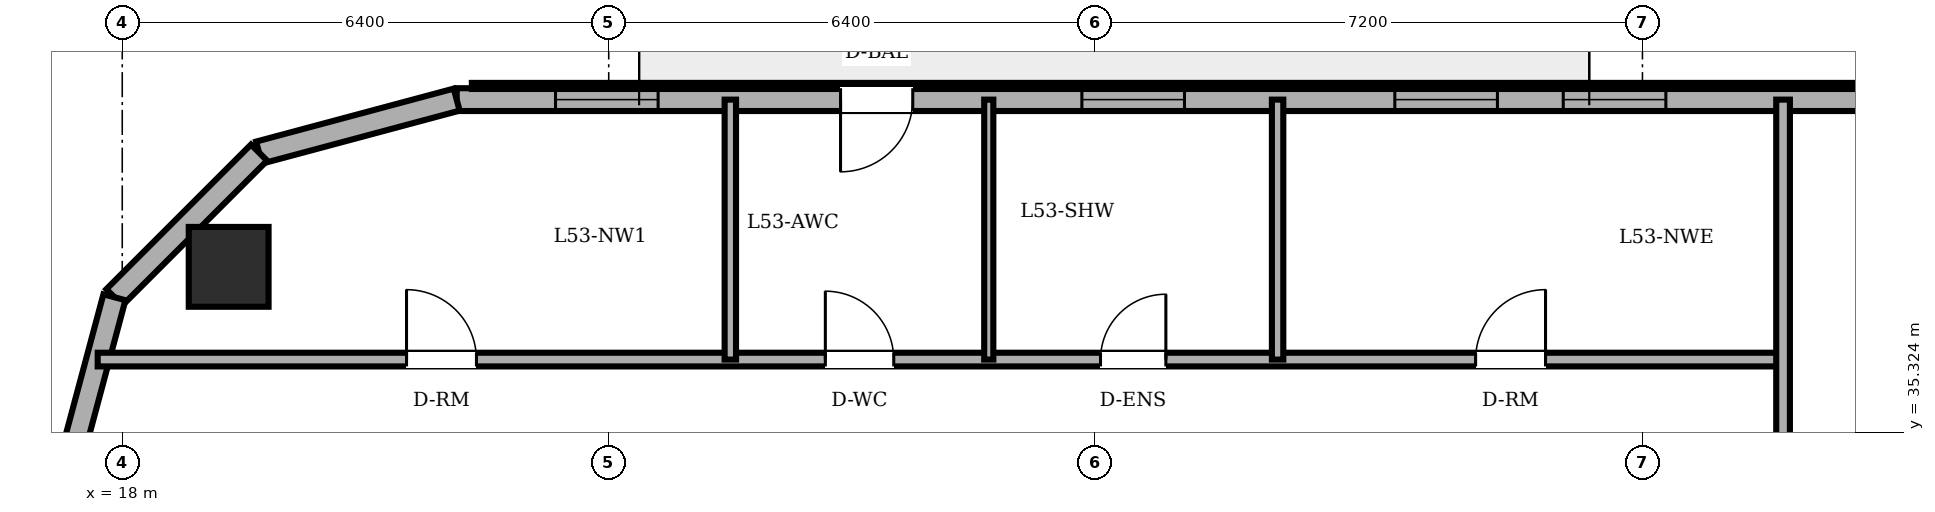
"""IFC4 building model, lengths in metres.
Left out: names, types, materials, properties, quantities, classifications, styles, units other than length and angle.
Written with IfcOpenShell. Run it as: python <this file> out.ifc"""

import sys

from ifc_helpers import new_model, si_unit, direction, frame, frame_2d, origin, origin_2d, place, context, subcontext, project, spatial, rectangle, circle, extrude, element, fill, save


model = new_model("IFC4")
c1 = context("Model", 3, precision=1e-05, world=origin(), true_north=direction((0.0, 1.0)))
c2 = subcontext(c1, "Body", "Model", "MODEL_VIEW")
j1 = project(units=[si_unit("LENGTHUNIT", "METRE"), si_unit("PLANEANGLEUNIT", "RADIAN")], contexts=[c1])
p1 = place(None, origin())
s1 = spatial("IfcSite", under=j1, at=p1, CompositionType="ELEMENT")
p2 = place(p1, origin())
s2 = spatial("IfcBuilding", under=s1, at=p2, CompositionType="ELEMENT")
p3 = place(p2, frame((0.0, 0.0, 204.9)))
s3 = spatial("IfcBuildingStorey", under=s2, at=p3, CompositionType="ELEMENT", Elevation=204.9)
p4 = place(p3, frame((19.4, 37.5, 0.0), z_axis=(0.0, 0.0, 1.0), x_axis=(1.0, 0.0, 0.0)))
e1 = element("IfcColumn", 1, at=p4, inside=s3, PredefinedType="COLUMN", context=c2, shape_type="SweptSolid", body=[
    extrude(circle(Radius=0.525, at=origin_2d()), origin(), (0.0, 0.0, 1.0), 3.6),
])
p5 = place(p3, frame((54.885, 39.7, 0.0), z_axis=(0.0, 0.0, 1.0), x_axis=(-1.0, 0.0, 0.0)))
e2 = element("IfcWall", 2, at=p5, inside=s3, PredefinedType="SOLIDWALL", context=c2, shape_type="SweptSolid", body=[
    extrude(rectangle(XDim=32.485, YDim=0.3, at=frame_2d((16.243, 0.0))), origin(), (0.0, 0.0, 1.0), 3.4),
])
p6 = place(p5, frame((26.485, 0.0, 0.0)))
e3 = element("IfcOpeningElement", 3, at=p6, cuts=e2, PredefinedType="OPENING", context=c2, shape_type="SweptSolid", body=[
    extrude(rectangle(XDim=0.95, YDim=2.2, at=frame_2d((0.475, 1.1))), frame((0.0, 0.16, 0.0), z_axis=(0.0, -1.0, 0.0), x_axis=(1.0, 0.0, 0.0)), (0.0, 0.0, 1.0), 0.32),
])
p7 = place(p5, frame((5.846, 0.0, 0.85)))
e4 = element("IfcOpeningElement", 4, at=p7, cuts=e2, PredefinedType="OPENING", context=c2, shape_type="SweptSolid", body=[
    extrude(rectangle(XDim=1.35, YDim=1.55, at=frame_2d((0.675, 0.775))), frame((0.0, 0.16, 0.0), z_axis=(0.0, -1.0, 0.0), x_axis=(1.0, 0.0, 0.0)), (0.0, 0.0, 1.0), 0.32),
])
p8 = place(p5, frame((10.103, 0.0, 0.85)))
e5 = element("IfcOpeningElement", 5, at=p8, cuts=e2, PredefinedType="OPENING", context=c2, shape_type="SweptSolid", body=[
    extrude(rectangle(XDim=1.35, YDim=1.55, at=frame_2d((0.675, 0.775))), frame((0.0, 0.16, 0.0), z_axis=(0.0, -1.0, 0.0), x_axis=(1.0, 0.0, 0.0)), (0.0, 0.0, 1.0), 0.32),
])
p9 = place(p5, frame((16.577, 0.0, 0.85)))
e6 = element("IfcOpeningElement", 6, at=p9, cuts=e2, PredefinedType="OPENING", context=c2, shape_type="SweptSolid", body=[
    extrude(rectangle(XDim=1.35, YDim=1.55, at=frame_2d((0.675, 0.775))), frame((0.0, 0.16, 0.0), z_axis=(0.0, -1.0, 0.0), x_axis=(1.0, 0.0, 0.0)), (0.0, 0.0, 1.0), 0.32),
])
p10 = place(p5, frame((18.793, 0.0, 0.85)))
e7 = element("IfcOpeningElement", 7, at=p10, cuts=e2, PredefinedType="OPENING", context=c2, shape_type="SweptSolid", body=[
    extrude(rectangle(XDim=1.35, YDim=1.55, at=frame_2d((0.675, 0.775))), frame((0.0, 0.16, 0.0), z_axis=(0.0, -1.0, 0.0), x_axis=(1.0, 0.0, 0.0)), (0.0, 0.0, 1.0), 0.32),
])
p11 = place(p5, frame((22.91, 0.0, 0.85)))
e8 = element("IfcOpeningElement", 8, at=p11, cuts=e2, PredefinedType="OPENING", context=c2, shape_type="SweptSolid", body=[
    extrude(rectangle(XDim=1.35, YDim=1.55, at=frame_2d((0.675, 0.775))), frame((0.0, 0.16, 0.0), z_axis=(0.0, -1.0, 0.0), x_axis=(1.0, 0.0, 0.0)), (0.0, 0.0, 1.0), 0.32),
])
p12 = place(p5, frame((29.835, 0.0, 0.85)))
e9 = element("IfcOpeningElement", 9, at=p12, cuts=e2, PredefinedType="OPENING", context=c2, shape_type="SweptSolid", body=[
    extrude(rectangle(XDim=1.35, YDim=1.55, at=frame_2d((0.675, 0.775))), frame((0.0, 0.16, 0.0), z_axis=(0.0, -1.0, 0.0), x_axis=(1.0, 0.0, 0.0)), (0.0, 0.0, 1.0), 0.32),
])
p13 = place(p3, frame((22.4, 39.7, 0.0), z_axis=(0.0, 0.0, 1.0), x_axis=(-0.965889330541, -0.258955210695, 0.0)))
e10 = element("IfcWall", 10, at=p13, inside=s3, PredefinedType="SOLIDWALL", context=c2, shape_type="SweptSolid", body=[
    extrude(rectangle(XDim=2.692, YDim=0.3, at=frame_2d((1.346, 0.0))), origin(), (0.0, 0.0, 1.0), 3.4),
])
p14 = place(p3, frame((19.8, 39.003, 0.0), z_axis=(0.0, 0.0, 1.0), x_axis=(-0.707152139074, -0.70706142039, 0.0)))
e11 = element("IfcWall", 11, at=p14, inside=s3, PredefinedType="SOLIDWALL", context=c2, shape_type="SweptSolid", body=[
    extrude(rectangle(XDim=2.691, YDim=0.3, at=frame_2d((1.346, 0.0))), origin(), (0.0, 0.0, 1.0), 3.4),
])
p15 = place(p3, frame((17.897, 37.1, 0.0), z_axis=(0.0, 0.0, 1.0), x_axis=(-0.258932525951, -0.965895412042, 0.0)))
e12 = element("IfcWall", 12, at=p15, inside=s3, PredefinedType="SOLIDWALL", context=c2, shape_type="SweptSolid", body=[
    extrude(rectangle(XDim=2.692, YDim=0.3, at=frame_2d((1.346, 0.0))), origin(), (0.0, 0.0, 1.0), 3.4),
])
p16 = place(p3, frame((17.677, 36.28, 0.0), z_axis=(0.0, 0.0, 1.0), x_axis=(1.0, 0.0, 0.0)))
e13 = element("IfcWall", 13, at=p16, inside=s3, PredefinedType="PARTITIONING", context=c2, shape_type="SweptSolid", body=[
    extrude(rectangle(XDim=22.173, YDim=0.18, at=frame_2d((11.086, 0.0))), origin(), (0.0, 0.0, 1.0), 3.4),
])
p17 = place(p16, frame((9.573, 0.0, 0.0)))
e14 = element("IfcOpeningElement", 14, at=p17, cuts=e13, PredefinedType="OPENING", context=c2, shape_type="SweptSolid", body=[
    extrude(rectangle(XDim=0.9, YDim=2.1, at=frame_2d((0.45, 1.05))), frame((0.0, 0.1, 0.0), z_axis=(0.0, -1.0, 0.0), x_axis=(1.0, 0.0, 0.0)), (0.0, 0.0, 1.0), 0.2),
])
p18 = place(p16, frame((13.193, 0.0, 0.0)))
e15 = element("IfcOpeningElement", 15, at=p18, cuts=e13, PredefinedType="OPENING", context=c2, shape_type="SweptSolid", body=[
    extrude(rectangle(XDim=0.86, YDim=2.1, at=frame_2d((0.43, 1.05))), frame((0.0, 0.1, 0.0), z_axis=(0.0, -1.0, 0.0), x_axis=(1.0, 0.0, 0.0)), (0.0, 0.0, 1.0), 0.2),
])
p19 = place(p16, frame((4.063, 0.0, 0.0)))
e16 = element("IfcOpeningElement", 16, at=p19, cuts=e13, PredefinedType="OPENING", context=c2, shape_type="SweptSolid", body=[
    extrude(rectangle(XDim=0.92, YDim=2.1, at=frame_2d((0.46, 1.05))), frame((0.0, 0.1, 0.0), z_axis=(0.0, -1.0, 0.0), x_axis=(1.0, 0.0, 0.0)), (0.0, 0.0, 1.0), 0.2),
])
p20 = place(p16, frame((18.128, 0.0, 0.0)))
e17 = element("IfcOpeningElement", 17, at=p20, cuts=e13, PredefinedType="OPENING", context=c2, shape_type="SweptSolid", body=[
    extrude(rectangle(XDim=0.92, YDim=2.1, at=frame_2d((0.46, 1.05))), frame((0.0, 0.1, 0.0), z_axis=(0.0, -1.0, 0.0), x_axis=(1.0, 0.0, 0.0)), (0.0, 0.0, 1.0), 0.2),
])
p21 = place(p3, frame((26.0, 36.28, 0.0), z_axis=(0.0, 0.0, 1.0), x_axis=(0.0, 1.0, 0.0)))
e18 = element("IfcWall", 18, at=p21, inside=s3, PredefinedType="PARTITIONING", context=c2, shape_type="SweptSolid", body=[
    extrude(rectangle(XDim=3.42, YDim=0.15, at=frame_2d((1.71, 0.0))), origin(), (0.0, 0.0, 1.0), 3.4),
])
p22 = place(p3, frame((29.4, 36.28, 0.0), z_axis=(0.0, 0.0, 1.0), x_axis=(0.0, 1.0, 0.0)))
e19 = element("IfcWall", 19, at=p22, inside=s3, PredefinedType="PARTITIONING", context=c2, shape_type="SweptSolid", body=[
    extrude(rectangle(XDim=3.42, YDim=0.12, at=frame_2d((1.71, 0.0))), origin(), (0.0, 0.0, 1.0), 3.4),
])
p23 = place(p3, frame((33.2, 36.28, 0.0), z_axis=(0.0, 0.0, 1.0), x_axis=(0.0, 1.0, 0.0)))
e20 = element("IfcWall", 20, at=p23, inside=s3, PredefinedType="PARTITIONING", context=c2, shape_type="SweptSolid", body=[
    extrude(rectangle(XDim=3.42, YDim=0.15, at=frame_2d((1.71, 0.0))), origin(), (0.0, 0.0, 1.0), 3.4),
])
p24 = place(p3, frame((39.85, 25.18, 0.0), z_axis=(0.0, 0.0, 1.0), x_axis=(0.0, 1.0, 0.0)))
e21 = element("IfcWall", 21, at=p24, inside=s3, PredefinedType="PARTITIONING", context=c2, shape_type="SweptSolid", body=[
    extrude(rectangle(XDim=14.52, YDim=0.18, at=frame_2d((7.26, 0.0))), origin(), (0.0, 0.0, 1.0), 3.4),
])
p25 = place(p6, origin())
e22 = element("IfcDoor", 22, at=p25, inside=s3, OperationType="SINGLE_SWING_RIGHT", PredefinedType="DOOR", context=c2, shape_type="SweptSolid", body=[
    extrude(rectangle(XDim=0.95, YDim=2.2, at=frame_2d((0.475, 1.1))), frame((0.0, 0.025, 0.0), z_axis=(0.0, -1.0, 0.0), x_axis=(1.0, 0.0, 0.0)), (0.0, 0.0, 1.0), 0.05),
])
fill(e3, e22)
p26 = place(p9, origin())
e23 = element("IfcWindow", 23, at=p26, inside=s3, PartitioningType="SINGLE_PANEL", PredefinedType="WINDOW", context=c2, shape_type="SweptSolid", body=[
    extrude(rectangle(XDim=1.35, YDim=1.55, at=frame_2d((0.675, 0.775))), frame((0.0, 0.03, 0.0), z_axis=(0.0, -1.0, 0.0), x_axis=(1.0, 0.0, 0.0)), (0.0, 0.0, 1.0), 0.06),
])
fill(e6, e23)
p27 = place(p10, origin())
e24 = element("IfcWindow", 24, at=p27, inside=s3, PartitioningType="SINGLE_PANEL", PredefinedType="WINDOW", context=c2, shape_type="SweptSolid", body=[
    extrude(rectangle(XDim=1.35, YDim=1.55, at=frame_2d((0.675, 0.775))), frame((0.0, 0.03, 0.0), z_axis=(0.0, -1.0, 0.0), x_axis=(1.0, 0.0, 0.0)), (0.0, 0.0, 1.0), 0.06),
])
fill(e7, e24)
p28 = place(p11, origin())
e25 = element("IfcWindow", 25, at=p28, inside=s3, PartitioningType="SINGLE_PANEL", PredefinedType="WINDOW", context=c2, shape_type="SweptSolid", body=[
    extrude(rectangle(XDim=1.35, YDim=1.55, at=frame_2d((0.675, 0.775))), frame((0.0, 0.03, 0.0), z_axis=(0.0, -1.0, 0.0), x_axis=(1.0, 0.0, 0.0)), (0.0, 0.0, 1.0), 0.06),
])
fill(e8, e25)
p29 = place(p12, origin())
e26 = element("IfcWindow", 26, at=p29, inside=s3, PartitioningType="SINGLE_PANEL", PredefinedType="WINDOW", context=c2, shape_type="SweptSolid", body=[
    extrude(rectangle(XDim=1.35, YDim=1.55, at=frame_2d((0.675, 0.775))), frame((0.0, 0.03, 0.0), z_axis=(0.0, -1.0, 0.0), x_axis=(1.0, 0.0, 0.0)), (0.0, 0.0, 1.0), 0.06),
])
fill(e9, e26)
p30 = place(p17, origin())
e27 = element("IfcDoor", 27, at=p30, inside=s3, OperationType="SINGLE_SWING_LEFT", PredefinedType="DOOR", context=c2, shape_type="SweptSolid", body=[
    extrude(rectangle(XDim=0.9, YDim=2.1, at=frame_2d((0.45, 1.05))), frame((0.0, 0.025, 0.0), z_axis=(0.0, -1.0, 0.0), x_axis=(1.0, 0.0, 0.0)), (0.0, 0.0, 1.0), 0.05),
])
fill(e14, e27)
p31 = place(p18, origin())
e28 = element("IfcDoor", 28, at=p31, inside=s3, OperationType="SINGLE_SWING_RIGHT", PredefinedType="DOOR", context=c2, shape_type="SweptSolid", body=[
    extrude(rectangle(XDim=0.86, YDim=2.1, at=frame_2d((0.43, 1.05))), frame((0.0, 0.025, 0.0), z_axis=(0.0, -1.0, 0.0), x_axis=(1.0, 0.0, 0.0)), (0.0, 0.0, 1.0), 0.05),
])
fill(e15, e28)
p32 = place(p19, origin())
e29 = element("IfcDoor", 29, at=p32, inside=s3, OperationType="SINGLE_SWING_LEFT", PredefinedType="DOOR", context=c2, shape_type="SweptSolid", body=[
    extrude(rectangle(XDim=0.92, YDim=2.1, at=frame_2d((0.46, 1.05))), frame((0.0, 0.025, 0.0), z_axis=(0.0, -1.0, 0.0), x_axis=(1.0, 0.0, 0.0)), (0.0, 0.0, 1.0), 0.05),
])
fill(e16, e29)
p33 = place(p20, origin())
e30 = element("IfcDoor", 30, at=p33, inside=s3, OperationType="SINGLE_SWING_RIGHT", PredefinedType="DOOR", context=c2, shape_type="SweptSolid", body=[
    extrude(rectangle(XDim=0.92, YDim=2.1, at=frame_2d((0.46, 1.05))), frame((0.0, 0.025, 0.0), z_axis=(0.0, -1.0, 0.0), x_axis=(1.0, 0.0, 0.0)), (0.0, 0.0, 1.0), 0.05),
])
fill(e17, e30)
save(model, sys.argv[1])
